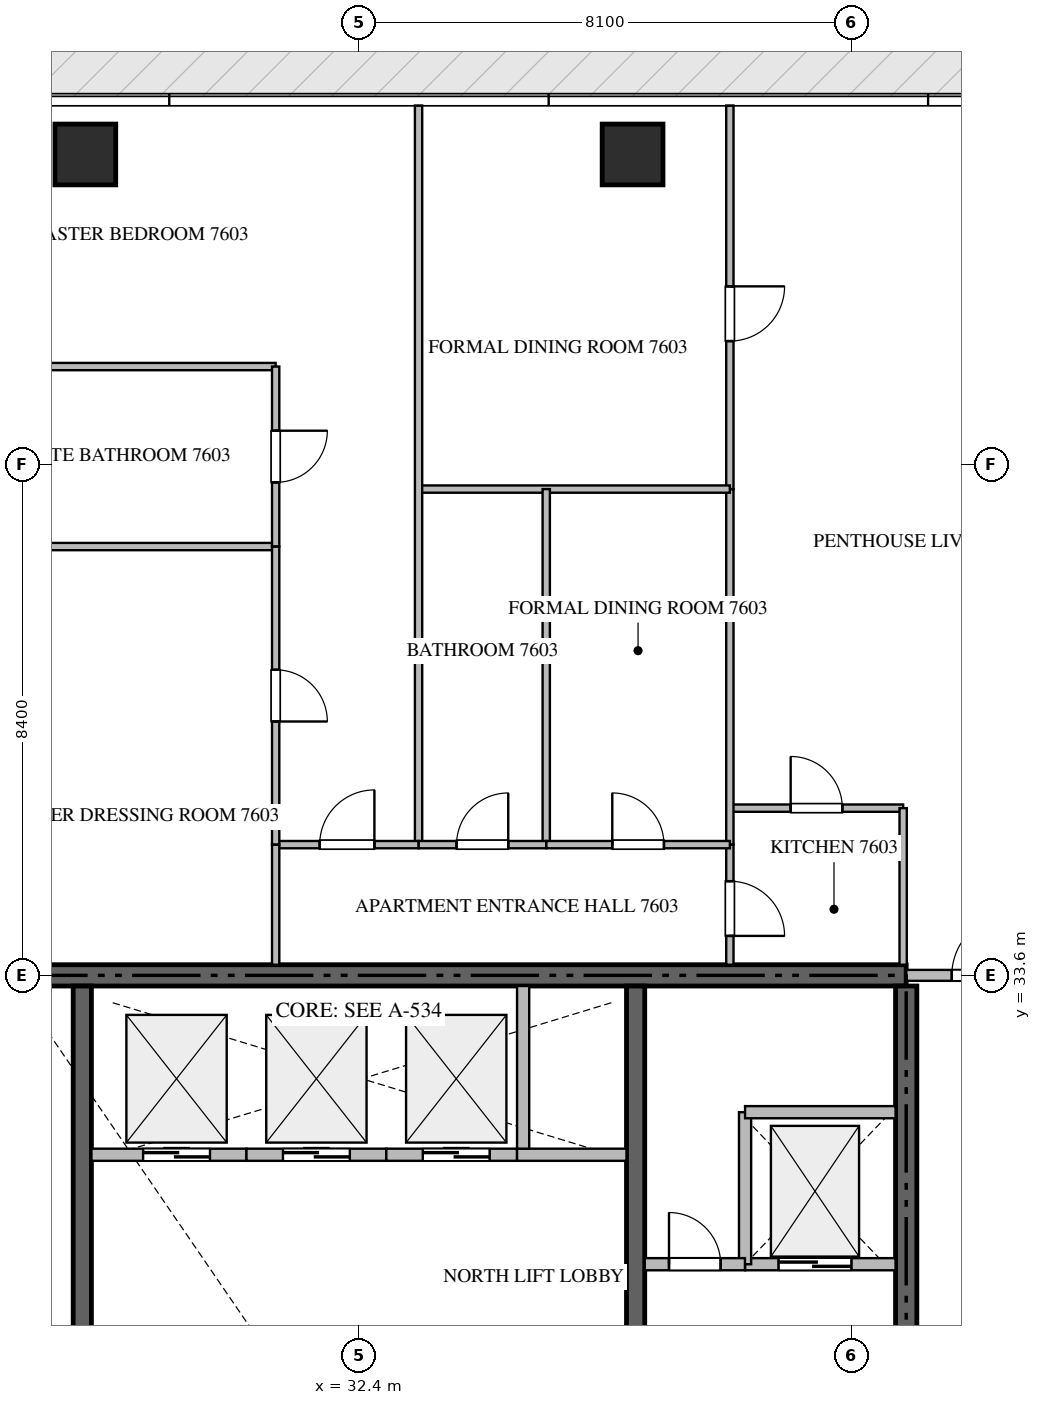
"""IFC4 building model, lengths in metres.
Left out: names, types, materials, properties, quantities, classifications, styles, units other than length and angle.
Written with IfcOpenShell. Run it as: python <this file> out.ifc"""

import sys

from ifc_helpers import new_model, si_unit, direction, frame, frame_2d, origin, origin_2d, place, context, subcontext, project, spatial, rectangle, extrude, source, transform, mapped, element, fill, save


model = new_model("IFC4")
c1 = context("Model", 3, precision=1e-05, world=origin(), true_north=direction((0.0, 1.0)))
c2 = subcontext(c1, "Body", "Model", "MODEL_VIEW")
j1 = project(units=[si_unit("LENGTHUNIT", "METRE"), si_unit("PLANEANGLEUNIT", "RADIAN")], contexts=[c1])
p1 = place(None, origin())
s1 = spatial("IfcSite", under=j1, at=p1, CompositionType="ELEMENT")
p2 = place(p1, origin())
s2 = spatial("IfcBuilding", under=s1, at=p2, CompositionType="ELEMENT")
p3 = place(p2, frame((0.0, 0.0, 305.6)))
s3 = spatial("IfcBuildingStorey", under=s2, at=p3, CompositionType="ELEMENT", Elevation=305.6)
p4 = place(p3, frame((41.4, 33.6, -0.26), z_axis=(0.0, 0.0, 1.0), x_axis=(-1.0, 0.0, 0.0)))
e1 = element("IfcWall", 1, at=p4, inside=s3, PredefinedType="SHEAR", context=c2, shape_type="SweptSolid", body=[
    extrude(rectangle(XDim=18.0, YDim=0.35, at=frame_2d((9.0, 0.0))), origin(), (0.0, 0.0, 1.0), 4.048),
])
p5 = place(p3, frame((41.4, 27.75, -0.26), z_axis=(0.0, 0.0, 1.0), x_axis=(0.0, 1.0, 0.0)))
e2 = element("IfcWall", 2, at=p5, inside=s3, PredefinedType="SHEAR", context=c2, shape_type="SweptSolid", body=[
    extrude(rectangle(XDim=5.675, YDim=0.35, at=frame_2d((2.837, 0.0))), origin(), (0.0, 0.0, 1.0), 4.048),
])
p6 = place(p3, frame((27.85, 23.55, -0.26), z_axis=(0.0, 0.0, 1.0), x_axis=(0.0, 1.0, 0.0)))
e3 = element("IfcWall", 3, at=p6, inside=s3, PredefinedType="SHEAR", context=c2, shape_type="SweptSolid", body=[
    extrude(rectangle(XDim=9.875, YDim=0.3, at=frame_2d((4.938, 0.0))), origin(), (0.0, 0.0, 1.0), 4.048),
])
p7 = place(p3, frame((36.95, 27.05, -0.26), z_axis=(0.0, 0.0, 1.0), x_axis=(0.0, 1.0, 0.0)))
e4 = element("IfcWall", 4, at=p7, inside=s3, PredefinedType="SHEAR", context=c2, shape_type="SweptSolid", body=[
    extrude(rectangle(XDim=6.375, YDim=0.3, at=frame_2d((3.188, 0.0))), origin(), (0.0, 0.0, 1.0), 4.048),
])
m1 = source(origin(), c2, "Body", "SweptSolid", [
    extrude(rectangle(XDim=1.0, YDim=1.0, at=origin_2d()), origin(), (0.0, 0.0, 1.0), 4.05),
])
for number, where, z_axis, x_axis in (
    (5, (27.9, 47.1, -0.26), (0.0, 0.0, 1.0), (1.0, 0.0, 0.0)),
    (6, (36.9, 47.1, -0.26), (0.0, 0.0, 1.0), (1.0, 0.0, 0.0)),
):
    element("IfcColumn", number, at=place(p3, frame(where, z_axis=z_axis, x_axis=x_axis)), inside=s3, PredefinedType="COLUMN", context=c2, shape_type="MappedRepresentation", body=[
        mapped(m1, transform((0.0, 0.0, 0.0), scale=1.0)),
    ])
p8 = place(p3, frame((38.75, 28.85, 0.0), z_axis=(0.0, 0.0, 1.0), x_axis=(1.0, 0.0, 0.0)))
e7 = element("IfcWall", 7, at=p8, inside=s3, PredefinedType="STANDARD", context=c2, shape_type="SweptSolid", body=[
    extrude(rectangle(XDim=2.475, YDim=0.2, at=frame_2d((1.238, 0.0))), origin(), (0.0, 0.0, 1.0), 3.79),
])
p9 = place(p8, frame((0.55, 0.0, 0.0)))
e8 = element("IfcOpeningElement", 8, at=p9, cuts=e7, PredefinedType="OPENING", context=c2, shape_type="SweptSolid", body=[
    extrude(rectangle(XDim=1.2, YDim=2.2, at=frame_2d((0.6, 1.1))), frame((0.0, 0.11, 0.0), z_axis=(0.0, -1.0, 0.0), x_axis=(1.0, 0.0, 0.0)), (0.0, 0.0, 1.0), 0.22),
])
p10 = place(p3, frame((28.0, 30.65, 0.0), z_axis=(0.0, 0.0, 1.0), x_axis=(1.0, 0.0, 0.0)))
e9 = element("IfcWall", 9, at=p10, inside=s3, PredefinedType="STANDARD", context=c2, shape_type="SweptSolid", body=[
    extrude(rectangle(XDim=2.55, YDim=0.2, at=frame_2d((1.275, 0.0))), origin(), (0.0, 0.0, 1.0), 3.79),
])
p11 = place(p10, frame((0.85, 0.0, 0.0)))
e10 = element("IfcOpeningElement", 10, at=p11, cuts=e9, PredefinedType="OPENING", context=c2, shape_type="SweptSolid", body=[
    extrude(rectangle(XDim=1.1, YDim=2.2, at=frame_2d((0.55, 1.1))), frame((0.0, 0.11, 0.0), z_axis=(0.0, -1.0, 0.0), x_axis=(1.0, 0.0, 0.0)), (0.0, 0.0, 1.0), 0.22),
])
p12 = place(p3, frame((30.55, 30.65, 0.0), z_axis=(0.0, 0.0, 1.0), x_axis=(1.0, 0.0, 0.0)))
e11 = element("IfcWall", 11, at=p12, inside=s3, PredefinedType="STANDARD", context=c2, shape_type="SweptSolid", body=[
    extrude(rectangle(XDim=2.3, YDim=0.2, at=frame_2d((1.15, 0.0))), origin(), (0.0, 0.0, 1.0), 3.79),
])
p13 = place(p12, frame((0.6, 0.0, 0.0)))
e12 = element("IfcOpeningElement", 12, at=p13, cuts=e11, PredefinedType="OPENING", context=c2, shape_type="SweptSolid", body=[
    extrude(rectangle(XDim=1.1, YDim=2.2, at=frame_2d((0.55, 1.1))), frame((0.0, 0.11, 0.0), z_axis=(0.0, -1.0, 0.0), x_axis=(1.0, 0.0, 0.0)), (0.0, 0.0, 1.0), 0.22),
])
p14 = place(p3, frame((32.85, 30.65, 0.0), z_axis=(0.0, 0.0, 1.0), x_axis=(1.0, 0.0, 0.0)))
e13 = element("IfcWall", 13, at=p14, inside=s3, PredefinedType="STANDARD", context=c2, shape_type="SweptSolid", body=[
    extrude(rectangle(XDim=2.15, YDim=0.2, at=frame_2d((1.075, 0.0))), origin(), (0.0, 0.0, 1.0), 3.79),
])
p15 = place(p14, frame((0.6, 0.0, 0.0)))
e14 = element("IfcOpeningElement", 14, at=p15, cuts=e13, PredefinedType="OPENING", context=c2, shape_type="SweptSolid", body=[
    extrude(rectangle(XDim=1.1, YDim=2.2, at=frame_2d((0.55, 1.1))), frame((0.0, 0.11, 0.0), z_axis=(0.0, -1.0, 0.0), x_axis=(1.0, 0.0, 0.0)), (0.0, 0.0, 1.0), 0.22),
])
p16 = place(p3, frame((35.0, 30.65, 0.0), z_axis=(0.0, 0.0, 1.0), x_axis=(1.0, 0.0, 0.0)))
e15 = element("IfcWall", 15, at=p16, inside=s3, PredefinedType="STANDARD", context=c2, shape_type="SweptSolid", body=[
    extrude(rectangle(XDim=1.8, YDim=0.2, at=frame_2d((0.9, 0.0))), origin(), (0.0, 0.0, 1.0), 3.79),
])
p17 = place(p3, frame((35.1, 30.75, 0.0), z_axis=(0.0, 0.0, 1.0), x_axis=(0.0, 1.0, 0.0)))
e16 = element("IfcWall", 16, at=p17, inside=s3, PredefinedType="STANDARD", context=c2, shape_type="SweptSolid", body=[
    extrude(rectangle(XDim=2.675, YDim=0.2, at=frame_2d((1.337, 0.0))), origin(), (0.0, 0.0, 1.0), 3.79),
])
p18 = place(p3, frame((38.75, 28.85, 0.0), z_axis=(0.0, 0.0, 1.0), x_axis=(0.0, 1.0, 0.0)))
e17 = element("IfcWall", 17, at=p18, inside=s3, PredefinedType="STANDARD", context=c2, shape_type="SweptSolid", body=[
    extrude(rectangle(XDim=2.5, YDim=0.2, at=frame_2d((1.25, 0.0))), origin(), (0.0, 0.0, 1.0), 3.79),
])
p19 = place(p3, frame((38.75, 31.35, 0.0), z_axis=(0.0, 0.0, 1.0), x_axis=(1.0, 0.0, 0.0)))
e18 = element("IfcWall", 18, at=p19, inside=s3, PredefinedType="STANDARD", context=c2, shape_type="SweptSolid", body=[
    extrude(rectangle(XDim=2.475, YDim=0.2, at=frame_2d((1.238, 0.0))), origin(), (0.0, 0.0, 1.0), 3.79),
])
p20 = place(p3, frame((37.1, 28.85, 0.0), z_axis=(0.0, 0.0, 1.0), x_axis=(1.0, 0.0, 0.0)))
e19 = element("IfcWall", 19, at=p20, inside=s3, PredefinedType="STANDARD", context=c2, shape_type="SweptSolid", body=[
    extrude(rectangle(XDim=1.648, YDim=0.2, at=frame_2d((0.824, 0.0))), origin(), (0.0, 0.0, 1.0), 3.79),
])
p21 = place(p20, frame((0.399, 0.0, 0.0)))
e20 = element("IfcOpeningElement", 20, at=p21, cuts=e19, PredefinedType="OPENING", context=c2, shape_type="SweptSolid", body=[
    extrude(rectangle(XDim=0.85, YDim=2.1, at=frame_2d((0.425, 1.05))), frame((0.0, 0.11, 0.0), z_axis=(0.0, -1.0, 0.0), x_axis=(1.0, 0.0, 0.0)), (0.0, 0.0, 1.0), 0.22),
])
p22 = place(p3, frame((41.402, 33.6, 0.0), z_axis=(0.0, 0.0, 1.0), x_axis=(1.0, 0.0, 0.0)))
e21 = element("IfcWall", 21, at=p22, inside=s3, PredefinedType="PARTITIONING", context=c2, shape_type="SweptSolid", body=[
    extrude(rectangle(XDim=2.496, YDim=0.18, at=frame_2d((1.248, 0.0))), origin(), (0.0, 0.0, 1.0), 3.79),
])
p23 = place(p22, frame((0.748, 0.0, 0.0)))
e22 = element("IfcOpeningElement", 22, at=p23, cuts=e21, PredefinedType="OPENING", context=c2, shape_type="SweptSolid", body=[
    extrude(rectangle(XDim=1.0, YDim=2.15, at=frame_2d((0.5, 1.075))), frame((0.0, 0.1, 0.0), z_axis=(0.0, -1.0, 0.0), x_axis=(1.0, 0.0, 0.0)), (0.0, 0.0, 1.0), 0.2),
])
p24 = place(p3, frame((38.5, 36.35, 0.0), z_axis=(0.0, 0.0, 1.0), x_axis=(1.0, 0.0, 0.0)))
e23 = element("IfcWall", 23, at=p24, inside=s3, PredefinedType="PARTITIONING", context=c2, shape_type="SweptSolid", body=[
    extrude(rectangle(XDim=2.85, YDim=0.12, at=frame_2d((1.425, 0.0))), origin(), (0.0, 0.0, 1.0), 3.79),
])
p25 = place(p24, frame((1.0, 0.0, 0.0)))
e24 = element("IfcOpeningElement", 24, at=p25, cuts=e23, PredefinedType="OPENING", context=c2, shape_type="SweptSolid", body=[
    extrude(rectangle(XDim=0.85, YDim=2.1, at=frame_2d((0.425, 1.05))), frame((0.0, 0.07, 0.0), z_axis=(0.0, -1.0, 0.0), x_axis=(1.0, 0.0, 0.0)), (0.0, 0.0, 1.0), 0.14),
])
p26 = place(p3, frame((41.35, 36.35, 0.0), z_axis=(0.0, 0.0, 1.0), x_axis=(0.0, -1.0, 0.0)))
e25 = element("IfcWall", 25, at=p26, inside=s3, PredefinedType="PARTITIONING", context=c2, shape_type="SweptSolid", body=[
    extrude(rectangle(XDim=2.575, YDim=0.12, at=frame_2d((1.288, 0.0))), origin(), (0.0, 0.0, 1.0), 3.79),
])
p27 = place(p3, frame((38.5, 35.75, 0.0), z_axis=(0.0, 0.0, 1.0), x_axis=(0.0, -1.0, 0.0)))
e26 = element("IfcWall", 26, at=p27, inside=s3, PredefinedType="PARTITIONING", context=c2, shape_type="SweptSolid", body=[
    extrude(rectangle(XDim=1.975, YDim=0.12, at=frame_2d((0.988, 0.0))), origin(), (0.0, 0.0, 1.0), 3.79),
])
p28 = place(p27, frame((0.601, 0.0, 0.0)))
e27 = element("IfcOpeningElement", 27, at=p28, cuts=e26, PredefinedType="OPENING", context=c2, shape_type="SweptSolid", body=[
    extrude(rectangle(XDim=0.9, YDim=2.1, at=frame_2d((0.45, 1.05))), frame((0.0, 0.07, 0.0), z_axis=(0.0, -1.0, 0.0), x_axis=(1.0, 0.0, 0.0)), (0.0, 0.0, 1.0), 0.14),
])
p29 = place(p3, frame((38.5, 47.905, 0.0), z_axis=(0.0, 0.0, 1.0), x_axis=(0.0, -1.0, 0.0)))
e28 = element("IfcWall", 28, at=p29, inside=s3, PredefinedType="PARTITIONING", context=c2, shape_type="SweptSolid", body=[
    extrude(rectangle(XDim=6.308, YDim=0.12, at=frame_2d((3.154, 0.0))), origin(), (0.0, 0.0, 1.0), 3.79),
])
p30 = place(p29, frame((2.974, 0.0, 0.0)))
e29 = element("IfcOpeningElement", 29, at=p30, cuts=e28, PredefinedType="OPENING", context=c2, shape_type="SweptSolid", body=[
    extrude(rectangle(XDim=0.9, YDim=2.1, at=frame_2d((0.45, 1.05))), frame((0.0, 0.07, 0.0), z_axis=(0.0, -1.0, 0.0), x_axis=(1.0, 0.0, 0.0)), (0.0, 0.0, 1.0), 0.14),
])
p31 = place(p3, frame((38.5, 41.595, 0.0), z_axis=(0.0, 0.0, 1.0), x_axis=(0.0, -1.0, 0.0)))
e30 = element("IfcWall", 30, at=p31, inside=s3, PredefinedType="PARTITIONING", context=c2, shape_type="SweptSolid", body=[
    extrude(rectangle(XDim=5.843, YDim=0.12, at=frame_2d((2.921, 0.0))), origin(), (0.0, 0.0, 1.0), 3.79),
])
p32 = place(p3, frame((33.38, 41.597, 0.0), z_axis=(0.0, 0.0, 1.0), x_axis=(1.0, 0.0, 0.0)))
e31 = element("IfcWall", 31, at=p32, inside=s3, PredefinedType="PARTITIONING", context=c2, shape_type="SweptSolid", body=[
    extrude(rectangle(XDim=5.12, YDim=0.12, at=frame_2d((2.56, 0.0))), origin(), (0.0, 0.0, 1.0), 3.79),
])
p33 = place(p3, frame((33.38, 47.905, 0.0), z_axis=(0.0, 0.0, 1.0), x_axis=(0.0, -1.0, 0.0)))
e32 = element("IfcWall", 32, at=p33, inside=s3, PredefinedType="PARTITIONING", context=c2, shape_type="SweptSolid", body=[
    extrude(rectangle(XDim=12.155, YDim=0.12, at=frame_2d((6.078, 0.0))), origin(), (0.0, 0.0, 1.0), 3.79),
])
p34 = place(p3, frame((35.48, 41.597, 0.0), z_axis=(0.0, 0.0, 1.0), x_axis=(0.0, -1.0, 0.0)))
e33 = element("IfcWall", 33, at=p34, inside=s3, PredefinedType="PARTITIONING", context=c2, shape_type="SweptSolid", body=[
    extrude(rectangle(XDim=5.847, YDim=0.12, at=frame_2d((2.923, 0.0))), origin(), (0.0, 0.0, 1.0), 3.79),
])
p35 = place(p3, frame((33.38, 35.75, 0.0), z_axis=(0.0, 0.0, 1.0), x_axis=(1.0, 0.0, 0.0)))
e34 = element("IfcWall", 34, at=p35, inside=s3, PredefinedType="PARTITIONING", context=c2, shape_type="SweptSolid", body=[
    extrude(rectangle(XDim=2.1, YDim=0.12, at=frame_2d((1.05, 0.0))), origin(), (0.0, 0.0, 1.0), 3.79),
])
p36 = place(p35, frame((0.625, 0.0, 0.0)))
e35 = element("IfcOpeningElement", 35, at=p36, cuts=e34, PredefinedType="OPENING", context=c2, shape_type="SweptSolid", body=[
    extrude(rectangle(XDim=0.85, YDim=2.1, at=frame_2d((0.425, 1.05))), frame((0.0, 0.07, 0.0), z_axis=(0.0, -1.0, 0.0), x_axis=(1.0, 0.0, 0.0)), (0.0, 0.0, 1.0), 0.14),
])
p37 = place(p3, frame((35.482, 35.75, 0.0), z_axis=(0.0, 0.0, 1.0), x_axis=(1.0, 0.0, 0.0)))
e36 = element("IfcWall", 36, at=p37, inside=s3, PredefinedType="PARTITIONING", context=c2, shape_type="SweptSolid", body=[
    extrude(rectangle(XDim=3.018, YDim=0.12, at=frame_2d((1.509, 0.0))), origin(), (0.0, 0.0, 1.0), 3.79),
])
p38 = place(p37, frame((1.084, 0.0, 0.0)))
e37 = element("IfcOpeningElement", 37, at=p38, cuts=e36, PredefinedType="OPENING", context=c2, shape_type="SweptSolid", body=[
    extrude(rectangle(XDim=0.85, YDim=2.1, at=frame_2d((0.425, 1.05))), frame((0.0, 0.07, 0.0), z_axis=(0.0, -1.0, 0.0), x_axis=(1.0, 0.0, 0.0)), (0.0, 0.0, 1.0), 0.14),
])
p39 = place(p3, frame((31.03, 35.75, 0.0), z_axis=(0.0, 0.0, 1.0), x_axis=(1.0, 0.0, 0.0)))
e38 = element("IfcWall", 38, at=p39, inside=s3, PredefinedType="PARTITIONING", context=c2, shape_type="SweptSolid", body=[
    extrude(rectangle(XDim=2.348, YDim=0.12, at=frame_2d((1.174, 0.0))), origin(), (0.0, 0.0, 1.0), 3.79),
])
p40 = place(p39, frame((0.724, 0.0, 0.0)))
e39 = element("IfcOpeningElement", 39, at=p40, cuts=e38, PredefinedType="OPENING", context=c2, shape_type="SweptSolid", body=[
    extrude(rectangle(XDim=0.9, YDim=2.1, at=frame_2d((0.45, 1.05))), frame((0.0, 0.07, 0.0), z_axis=(0.0, -1.0, 0.0), x_axis=(1.0, 0.0, 0.0)), (0.0, 0.0, 1.0), 0.14),
])
for number, where, z_axis, x_axis in (
    (40, (26.24, 43.612, 0.0), (0.0, 0.0, 1.0), (1.0, 0.0, 0.0)),
    (41, (26.24, 40.652, 0.0), (0.0, 0.0, 1.0), (1.0, 0.0, 0.0)),
):
    element("IfcWall", number, at=place(p3, frame(where, z_axis=z_axis, x_axis=x_axis)), inside=s3, PredefinedType="PARTITIONING", context=c2, shape_type="SweptSolid", body=[
        extrude(rectangle(XDim=4.79, YDim=0.12, at=frame_2d((2.395, 0.0))), origin(), (0.0, 0.0, 1.0), 3.79),
    ])
p41 = place(p3, frame((31.03, 43.612, 0.0), z_axis=(0.0, 0.0, 1.0), x_axis=(0.0, -1.0, 0.0)))
e42 = element("IfcWall", 42, at=p41, inside=s3, PredefinedType="PARTITIONING", context=c2, shape_type="SweptSolid", body=[
    extrude(rectangle(XDim=2.96, YDim=0.12, at=frame_2d((1.48, 0.0))), origin(), (0.0, 0.0, 1.0), 3.79),
])
p42 = place(p41, frame((1.055, 0.0, 0.0)))
e43 = element("IfcOpeningElement", 43, at=p42, cuts=e42, PredefinedType="OPENING", context=c2, shape_type="SweptSolid", body=[
    extrude(rectangle(XDim=0.85, YDim=2.1, at=frame_2d((0.425, 1.05))), frame((0.0, 0.07, 0.0), z_axis=(0.0, -1.0, 0.0), x_axis=(1.0, 0.0, 0.0)), (0.0, 0.0, 1.0), 0.14),
])
p43 = place(p3, frame((31.03, 40.65, 0.0), z_axis=(0.0, 0.0, 1.0), x_axis=(0.0, -1.0, 0.0)))
e44 = element("IfcWall", 44, at=p43, inside=s3, PredefinedType="PARTITIONING", context=c2, shape_type="SweptSolid", body=[
    extrude(rectangle(XDim=4.9, YDim=0.12, at=frame_2d((2.45, 0.0))), origin(), (0.0, 0.0, 1.0), 3.79),
])
p44 = place(p43, frame((2.025, 0.0, 0.0)))
e45 = element("IfcOpeningElement", 45, at=p44, cuts=e44, PredefinedType="OPENING", context=c2, shape_type="SweptSolid", body=[
    extrude(rectangle(XDim=0.85, YDim=2.1, at=frame_2d((0.425, 1.05))), frame((0.0, 0.07, 0.0), z_axis=(0.0, -1.0, 0.0), x_axis=(1.0, 0.0, 0.0)), (0.0, 0.0, 1.0), 0.14),
])
p45 = place(p3, frame((31.03, 35.748, 0.0), z_axis=(0.0, 0.0, 1.0), x_axis=(0.0, -1.0, 0.0)))
e46 = element("IfcWall", 46, at=p45, inside=s3, PredefinedType="PARTITIONING", context=c2, shape_type="SweptSolid", body=[
    extrude(rectangle(XDim=1.973, YDim=0.12, at=frame_2d((0.987, 0.0))), origin(), (0.0, 0.0, 1.0), 3.79),
])
m2 = source(origin(), c2, "Body", "SweptSolid", [
    extrude(rectangle(XDim=1.2, YDim=2.2, at=frame_2d((0.6, 1.1))), frame((0.0, 0.025, 0.0), z_axis=(0.0, -1.0, 0.0), x_axis=(1.0, 0.0, 0.0)), (0.0, 0.0, 1.0), 0.05),
])
p46 = place(p9, origin())
e47 = element("IfcDoor", 47, at=p46, inside=s3, OperationType="DOUBLE_DOOR_SLIDING", PredefinedType="DOOR", context=c2, shape_type="MappedRepresentation", body=[
    mapped(m2, transform((0.0, 0.0, 0.0), scale=1.0)),
])
fill(e8, e47)
m3 = source(origin(), c2, "Body", "SweptSolid", [
    extrude(rectangle(XDim=1.1, YDim=2.2, at=frame_2d((0.55, 1.1))), frame((0.0, 0.025, 0.0), z_axis=(0.0, -1.0, 0.0), x_axis=(1.0, 0.0, 0.0)), (0.0, 0.0, 1.0), 0.05),
])
p47 = place(p11, origin())
e48 = element("IfcDoor", 48, at=p47, inside=s3, OperationType="DOUBLE_DOOR_SLIDING", PredefinedType="DOOR", context=c2, shape_type="MappedRepresentation", body=[
    mapped(m3, transform((0.0, 0.0, 0.0), scale=1.0)),
])
fill(e10, e48)
p48 = place(p13, origin())
e49 = element("IfcDoor", 49, at=p48, inside=s3, OperationType="DOUBLE_DOOR_SLIDING", PredefinedType="DOOR", context=c2, shape_type="MappedRepresentation", body=[
    mapped(m3, transform((0.0, 0.0, 0.0), scale=1.0)),
])
fill(e12, e49)
p49 = place(p15, origin())
e50 = element("IfcDoor", 50, at=p49, inside=s3, OperationType="DOUBLE_DOOR_SLIDING", PredefinedType="DOOR", context=c2, shape_type="MappedRepresentation", body=[
    mapped(m3, transform((0.0, 0.0, 0.0), scale=1.0)),
])
fill(e14, e50)
m4 = source(origin(), c2, "Body", "SweptSolid", [
    extrude(rectangle(XDim=0.85, YDim=2.1, at=frame_2d((0.425, 1.05))), frame((0.0, 0.025, 0.0), z_axis=(0.0, -1.0, 0.0), x_axis=(1.0, 0.0, 0.0)), (0.0, 0.0, 1.0), 0.05),
])
p50 = place(p21, origin())
e51 = element("IfcDoor", 51, at=p50, inside=s3, OperationType="SINGLE_SWING_LEFT", PredefinedType="DOOR", context=c2, shape_type="MappedRepresentation", body=[
    mapped(m4, transform((0.0, 0.0, 0.0), scale=1.0)),
])
fill(e20, e51)
m5 = source(origin(), c2, "Body", "SweptSolid", [
    extrude(rectangle(XDim=1.0, YDim=2.15, at=frame_2d((0.5, 1.075))), frame((0.0, 0.025, 0.0), z_axis=(0.0, -1.0, 0.0), x_axis=(1.0, 0.0, 0.0)), (0.0, 0.0, 1.0), 0.05),
])
p51 = place(p23, origin())
e52 = element("IfcDoor", 52, at=p51, inside=s3, OperationType="SINGLE_SWING_RIGHT", PredefinedType="DOOR", context=c2, shape_type="MappedRepresentation", body=[
    mapped(m5, transform((0.0, 0.0, 0.0), scale=1.0)),
])
fill(e22, e52)
p52 = place(p25, origin())
e53 = element("IfcDoor", 53, at=p52, inside=s3, OperationType="SINGLE_SWING_LEFT", PredefinedType="DOOR", context=c2, shape_type="MappedRepresentation", body=[
    mapped(m4, transform((0.0, 0.0, 0.0), scale=1.0)),
])
fill(e24, e53)
m6 = source(origin(), c2, "Body", "SweptSolid", [
    extrude(rectangle(XDim=0.9, YDim=2.1, at=frame_2d((0.45, 1.05))), frame((0.0, 0.025, 0.0), z_axis=(0.0, -1.0, 0.0), x_axis=(1.0, 0.0, 0.0)), (0.0, 0.0, 1.0), 0.05),
])
p53 = place(p28, origin())
e54 = element("IfcDoor", 54, at=p53, inside=s3, OperationType="SINGLE_SWING_RIGHT", PredefinedType="DOOR", context=c2, shape_type="MappedRepresentation", body=[
    mapped(m6, transform((0.0, 0.0, 0.0), scale=1.0)),
])
fill(e27, e54)
p54 = place(p30, origin())
e55 = element("IfcDoor", 55, at=p54, inside=s3, OperationType="SINGLE_SWING_LEFT", PredefinedType="DOOR", context=c2, shape_type="MappedRepresentation", body=[
    mapped(m6, transform((0.0, 0.0, 0.0), scale=1.0)),
])
fill(e29, e55)
p55 = place(p36, origin())
e56 = element("IfcDoor", 56, at=p55, inside=s3, OperationType="SINGLE_SWING_RIGHT", PredefinedType="DOOR", context=c2, shape_type="MappedRepresentation", body=[
    mapped(m4, transform((0.0, 0.0, 0.0), scale=1.0)),
])
fill(e35, e56)
p56 = place(p38, origin())
e57 = element("IfcDoor", 57, at=p56, inside=s3, OperationType="SINGLE_SWING_LEFT", PredefinedType="DOOR", context=c2, shape_type="MappedRepresentation", body=[
    mapped(m4, transform((0.0, 0.0, 0.0), scale=1.0)),
])
fill(e37, e57)
p57 = place(p40, origin())
e58 = element("IfcDoor", 58, at=p57, inside=s3, OperationType="SINGLE_SWING_RIGHT", PredefinedType="DOOR", context=c2, shape_type="MappedRepresentation", body=[
    mapped(m6, transform((0.0, 0.0, 0.0), scale=1.0)),
])
fill(e39, e58)
p58 = place(p42, origin())
e59 = element("IfcDoor", 59, at=p58, inside=s3, OperationType="SINGLE_SWING_LEFT", PredefinedType="DOOR", context=c2, shape_type="MappedRepresentation", body=[
    mapped(m4, transform((0.0, 0.0, 0.0), scale=1.0)),
])
fill(e43, e59)
p59 = place(p44, origin())
e60 = element("IfcDoor", 60, at=p59, inside=s3, OperationType="SINGLE_SWING_RIGHT", PredefinedType="DOOR", context=c2, shape_type="MappedRepresentation", body=[
    mapped(m4, transform((0.0, 0.0, 0.0), scale=1.0)),
])
fill(e45, e60)
save(model, sys.argv[1])
